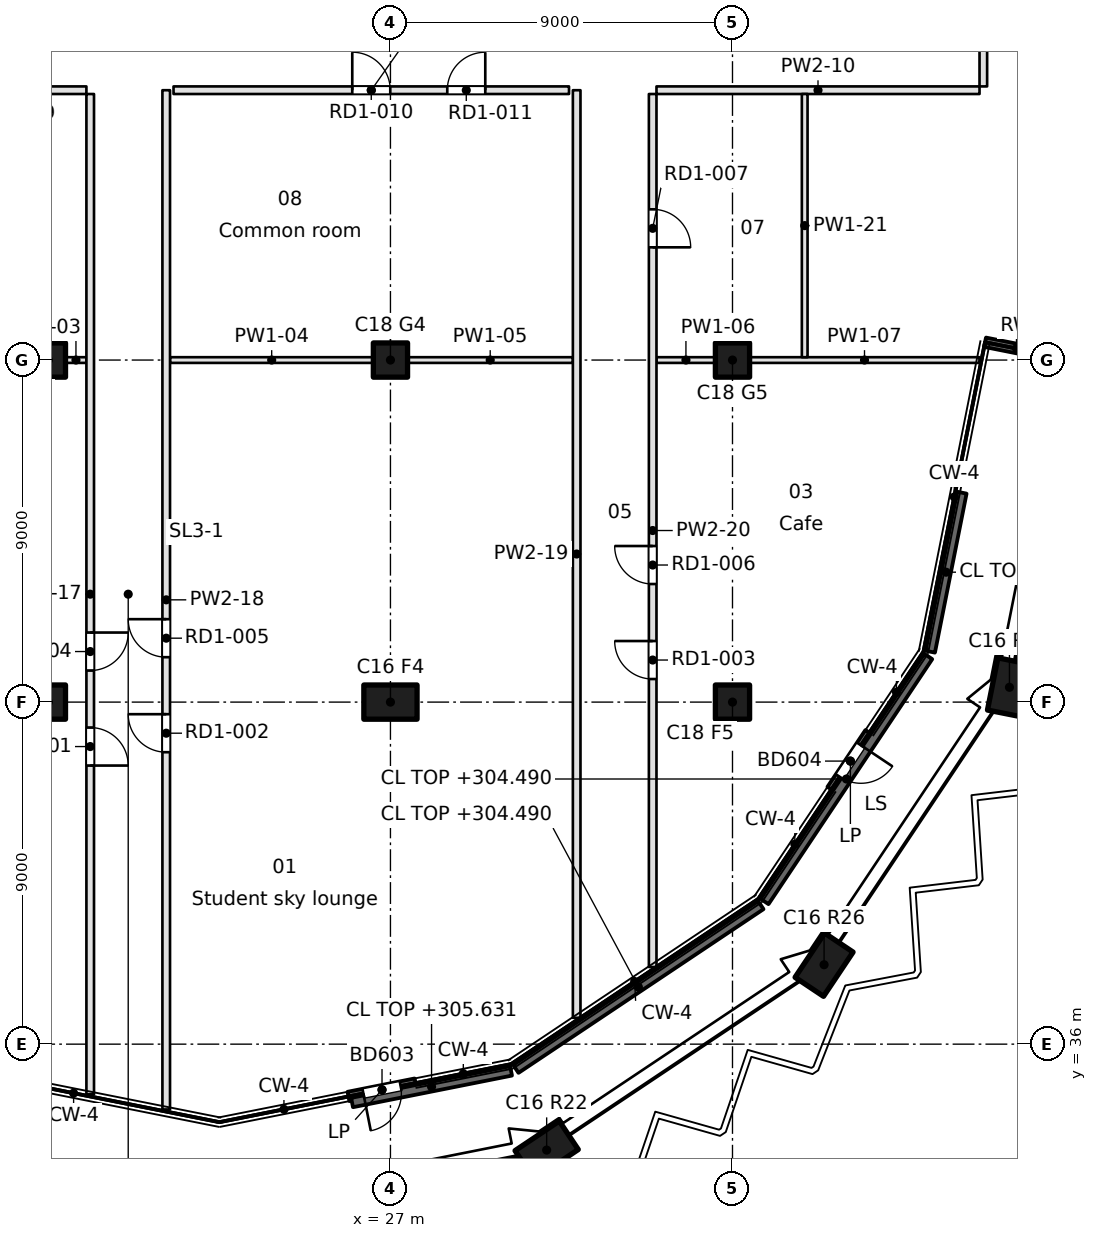
"""IFC4 building model, lengths in metres.
Left out: names, types, materials, properties, quantities, classifications, styles, units other than length and angle.
Written with IfcOpenShell. Run it as: python <this file> out.ifc"""

import sys

from ifc_helpers import new_model, si_unit, direction, frame, frame_2d, origin, origin_2d, place, context, subcontext, project, spatial, polyline, rectangle, outline, extrude, element, fill, save


model = new_model("IFC4")
c1 = context("Model", 3, precision=1e-05, world=origin(), true_north=direction((0.0, 1.0)))
c2 = subcontext(c1, "Body", "Model", "MODEL_VIEW")
j1 = project(units=[si_unit("LENGTHUNIT", "METRE"), si_unit("PLANEANGLEUNIT", "RADIAN")], contexts=[c1])
p1 = place(None, origin())
s1 = spatial("IfcSite", under=j1, at=p1, CompositionType="ELEMENT")
p2 = place(p1, origin())
s2 = spatial("IfcBuilding", under=s1, at=p2, CompositionType="ELEMENT")
p3 = place(p2, frame((0.0, 0.0, 299.3)))
s3 = spatial("IfcBuildingStorey", under=s2, at=p3, CompositionType="ELEMENT", Elevation=299.3)
p4 = place(p3, frame((31.11, 33.213, 0.0), z_axis=(0.0, 0.0, 1.0), x_axis=(0.831469612303, 0.55557023302, 0.0)))
e1 = element("IfcColumn", 1, at=p4, inside=s3, PredefinedType="COLUMN", context=c2, shape_type="SweptSolid", body=[
    extrude(rectangle(XDim=1.4, YDim=0.9, at=origin_2d()), origin(), (0.0, 0.0, 1.0), 3.45),
])
p5 = place(p3, frame((38.41, 38.09, 0.0), z_axis=(0.0, 0.0, 1.0), x_axis=(0.55557023302, 0.831469612303, 0.0)))
e2 = element("IfcColumn", 2, at=p5, inside=s3, PredefinedType="COLUMN", context=c2, shape_type="SweptSolid", body=[
    extrude(rectangle(XDim=1.4, YDim=0.9, at=origin_2d()), origin(), (0.0, 0.0, 1.0), 3.127),
])
p6 = place(p3, frame((43.287, 45.39, 0.0), z_axis=(0.0, 0.0, 1.0), x_axis=(0.195090322016, 0.980785280403, 0.0)))
e3 = element("IfcColumn", 3, at=p6, inside=s3, PredefinedType="COLUMN", context=c2, shape_type="SweptSolid", body=[
    extrude(rectangle(XDim=1.4, YDim=0.9, at=origin_2d()), origin(), (0.0, 0.0, 1.0), 3.45),
])
for number, where, z_axis, x_axis in (
    (4, (18.0, 45.0, 0.0), (0.0, 0.0, 1.0), (1.0, 0.0, 0.0)),
    (5, (18.0, 54.0, 0.0), (0.0, 0.0, 1.0), (1.0, 0.0, 0.0)),
):
    element("IfcColumn", number, at=place(p3, frame(where, z_axis=z_axis, x_axis=x_axis)), inside=s3, PredefinedType="COLUMN", context=c2, shape_type="SweptSolid", body=[
        extrude(rectangle(XDim=0.9, YDim=0.9, at=origin_2d()), origin(), (0.0, 0.0, 1.0), 3.7),
    ])
p7 = place(p3, frame((27.0, 45.0, 0.0), z_axis=(0.0, 0.0, 1.0), x_axis=(1.0, 0.0, 0.0)))
e6 = element("IfcColumn", 6, at=p7, inside=s3, PredefinedType="COLUMN", context=c2, shape_type="SweptSolid", body=[
    extrude(rectangle(XDim=1.4, YDim=0.9, at=origin_2d()), origin(), (0.0, 0.0, 1.0), 3.7),
])
p8 = place(p3, frame((27.0, 54.0, 0.0), z_axis=(0.0, 0.0, 1.0), x_axis=(1.0, 0.0, 0.0)))
e7 = element("IfcColumn", 7, at=p8, inside=s3, PredefinedType="COLUMN", context=c2, shape_type="SweptSolid", body=[
    extrude(rectangle(XDim=0.9, YDim=0.9, at=origin_2d()), origin(), (0.0, 0.0, 1.0), 3.7),
])
p9 = place(p3, frame((36.0, 45.0, 0.0), z_axis=(0.0, 0.0, 1.0), x_axis=(1.0, 0.0, 0.0)))
e8 = element("IfcColumn", 8, at=p9, inside=s3, PredefinedType="COLUMN", context=c2, shape_type="SweptSolid", body=[
    extrude(rectangle(XDim=0.9, YDim=0.9, at=origin_2d()), origin(), (0.0, 0.0, 1.0), 6.207),
])
p10 = place(p3, frame((36.0, 54.0, 0.0), z_axis=(0.0, 0.0, 1.0), x_axis=(1.0, 0.0, 0.0)))
e9 = element("IfcColumn", 9, at=p10, inside=s3, PredefinedType="COLUMN", context=c2, shape_type="SweptSolid", body=[
    extrude(rectangle(XDim=0.9, YDim=0.9, at=origin_2d()), origin(), (0.0, 0.0, 1.0), 3.7),
])
p11 = place(p3, frame((25.896, 34.624, 0.0), z_axis=(0.0, 0.0, 1.0), x_axis=(0.980793982239, 0.195046569833, 0.0)))
e10 = element("IfcWall", 10, at=p11, inside=s3, PredefinedType="SOLIDWALL", context=c2, shape_type="SweptSolid", body=[
    extrude(rectangle(XDim=1.8, YDim=0.25, at=frame_2d((0.9, 0.0))), origin(), (0.0, 0.0, 1.0), 3.25),
])
p12 = place(p11, frame((0.4, 0.0, 0.0)))
e11 = element("IfcOpeningElement", 11, at=p12, cuts=e10, PredefinedType="OPENING", context=c2, shape_type="SweptSolid", body=[
    extrude(rectangle(XDim=1.0, YDim=2.1, at=frame_2d((0.5, 1.05))), frame((0.0, 0.125, 0.0), z_axis=(0.0, -1.0, 0.0), x_axis=(1.0, 0.0, 0.0)), (0.0, 0.0, 1.0), 0.25),
])
p13 = place(p3, frame((38.602, 42.7, 0.0), z_axis=(0.0, 0.0, 1.0), x_axis=(0.555576323502, 0.83146554274, 0.0)))
e12 = element("IfcWall", 12, at=p13, inside=s3, PredefinedType="SOLIDWALL", context=c2, shape_type="SweptSolid", body=[
    extrude(rectangle(XDim=1.8, YDim=0.25, at=frame_2d((0.9, 0.0))), origin(), (0.0, 0.0, 1.0), 3.25),
])
p14 = place(p13, frame((0.4, 0.0, 0.0)))
e13 = element("IfcOpeningElement", 13, at=p14, cuts=e12, PredefinedType="OPENING", context=c2, shape_type="SweptSolid", body=[
    extrude(rectangle(XDim=1.0, YDim=2.1, at=frame_2d((0.5, 1.05))), frame((0.0, 0.125, 0.0), z_axis=(0.0, -1.0, 0.0), x_axis=(1.0, 0.0, 0.0)), (0.0, 0.0, 1.0), 0.25),
])
p15 = place(p3, frame((42.645, 54.469, 0.0), z_axis=(0.0, 0.0, 1.0), x_axis=(0.980846923473, -0.194780165092, 0.0)))
e14 = element("IfcWall", 14, at=p15, inside=s3, PredefinedType="SOLIDWALL", context=c2, shape_type="SweptSolid", body=[
    extrude(rectangle(XDim=1.687, YDim=0.25, at=frame_2d((0.844, 0.0))), origin(), (0.0, 0.0, 1.0), 3.25),
])
p16 = place(p3, frame((25.99, 34.464, 3.7), z_axis=(0.0, 0.0, 1.0), x_axis=(0.98079361582, 0.195048412366, 0.0)))
e15 = element("IfcWall", 15, at=p16, inside=s3, PredefinedType="SOLIDWALL", context=c2, shape_type="SweptSolid", body=[
    extrude(outline(polyline([(0.0, 0.0), (4.266, 0.0), (4.266, 1.514), (0.0, 2.631), (0.0, 0.0)])), frame((0.0, 0.125, 0.0), z_axis=(0.0, -1.0, 0.0), x_axis=(1.0, 0.0, 0.0)), (0.0, 0.0, 1.0), 0.25),
])
p17 = place(p3, frame((30.3, 35.348, 3.7), z_axis=(0.0, 0.0, 1.0), x_axis=(0.831458870803, 0.555586308474, 0.0)))
e16 = element("IfcWall", 16, at=p17, inside=s3, PredefinedType="SOLIDWALL", context=c2, shape_type="SweptSolid", body=[
    extrude(outline(polyline([(0.0, 0.0), (7.754, 0.0), (7.754, 0.776), (0.0, 1.49), (0.0, 0.0)])), frame((0.0, 0.125, 0.0), z_axis=(0.0, -1.0, 0.0), x_axis=(1.0, 0.0, 0.0)), (0.0, 0.0, 1.0), 0.25),
])
p18 = place(p3, frame((36.844, 39.753, 3.7), z_axis=(0.0, 0.0, 1.0), x_axis=(0.555586308474, 0.831458870803, 0.0)))
e17 = element("IfcWall", 17, at=p18, inside=s3, PredefinedType="SOLIDWALL", context=c2, shape_type="SweptSolid", body=[
    extrude(outline(polyline([(0.0, 0.0), (7.754, 0.0), (7.754, 1.49), (0.0, 0.776), (0.0, 0.0)])), frame((0.0, 0.125, 0.0), z_axis=(0.0, -1.0, 0.0), x_axis=(1.0, 0.0, 0.0)), (0.0, 0.0, 1.0), 0.25),
])
p19 = place(p3, frame((41.204, 46.326, 3.7), z_axis=(0.0, 0.0, 1.0), x_axis=(0.195103466612, 0.980782665689, 0.0)))
e18 = element("IfcWall", 18, at=p19, inside=s3, PredefinedType="SOLIDWALL", context=c2, shape_type="SweptSolid", body=[
    extrude(outline(polyline([(0.0, 0.0), (4.266, 0.0), (4.266, 2.631), (0.0, 1.514), (0.0, 0.0)])), frame((0.0, 0.125, 0.0), z_axis=(0.0, -1.0, 0.0), x_axis=(1.0, 0.0, 0.0)), (0.0, 0.0, 1.0), 0.25),
])
p20 = place(p3, frame((18.45, 54.0, 0.0), z_axis=(0.0, 0.0, 1.0), x_axis=(1.0, 0.0, 0.0)))
e19 = element("IfcWall", 19, at=p20, inside=s3, PredefinedType="PARTITIONING", context=c2, shape_type="SweptSolid", body=[
    extrude(rectangle(XDim=0.55, YDim=0.15, at=frame_2d((0.275, 0.0))), origin(), (0.0, 0.0, 1.0), 3.25),
])
p21 = place(p3, frame((21.2, 54.0, 0.0), z_axis=(0.0, 0.0, 1.0), x_axis=(1.0, 0.0, 0.0)))
e20 = element("IfcWall", 20, at=p21, inside=s3, PredefinedType="PARTITIONING", context=c2, shape_type="SweptSolid", body=[
    extrude(rectangle(XDim=5.35, YDim=0.15, at=frame_2d((2.675, 0.0))), origin(), (0.0, 0.0, 1.0), 3.25),
])
p22 = place(p3, frame((27.45, 54.0, 0.0), z_axis=(0.0, 0.0, 1.0), x_axis=(1.0, 0.0, 0.0)))
e21 = element("IfcWall", 21, at=p22, inside=s3, PredefinedType="PARTITIONING", context=c2, shape_type="SweptSolid", body=[
    extrude(rectangle(XDim=4.35, YDim=0.15, at=frame_2d((2.175, 0.0))), origin(), (0.0, 0.0, 1.0), 3.25),
])
p23 = place(p3, frame((34.0, 54.0, 0.0), z_axis=(0.0, 0.0, 1.0), x_axis=(1.0, 0.0, 0.0)))
e22 = element("IfcWall", 22, at=p23, inside=s3, PredefinedType="PARTITIONING", context=c2, shape_type="SweptSolid", body=[
    extrude(rectangle(XDim=1.55, YDim=0.15, at=frame_2d((0.775, 0.0))), origin(), (0.0, 0.0, 1.0), 3.25),
])
p24 = place(p3, frame((36.45, 54.0, 0.0), z_axis=(0.0, 0.0, 1.0), x_axis=(1.0, 0.0, 0.0)))
e23 = element("IfcWall", 23, at=p24, inside=s3, PredefinedType="PARTITIONING", context=c2, shape_type="SweptSolid", body=[
    extrude(rectangle(XDim=6.047, YDim=0.15, at=frame_2d((3.023, 0.0))), origin(), (0.0, 0.0, 1.0), 3.25),
])
p25 = place(p3, frame((19.0, 61.1, 0.0), z_axis=(0.0, 0.0, 1.0), x_axis=(-1.0, 0.0, 0.0)))
e24 = element("IfcWall", 24, at=p25, inside=s3, PredefinedType="PARTITIONING", context=c2, shape_type="SweptSolid", body=[
    extrude(rectangle(XDim=10.096, YDim=0.2, at=frame_2d((5.048, 0.0))), origin(), (0.0, 0.0, 1.0), 3.25),
])
p26 = place(p25, frame((4.548, 0.0, 0.0)))
e25 = element("IfcOpeningElement", 25, at=p26, cuts=e24, PredefinedType="OPENING", context=c2, shape_type="SweptSolid", body=[
    extrude(rectangle(XDim=1.0, YDim=2.1, at=frame_2d((0.5, 1.05))), frame((0.0, 0.1, 0.0), z_axis=(0.0, -1.0, 0.0), x_axis=(1.0, 0.0, 0.0)), (0.0, 0.0, 1.0), 0.2),
])
p27 = place(p25, frame((2.048, 0.0, 0.0)))
e26 = element("IfcOpeningElement", 26, at=p27, cuts=e24, PredefinedType="OPENING", context=c2, shape_type="SweptSolid", body=[
    extrude(rectangle(XDim=1.0, YDim=2.1, at=frame_2d((0.5, 1.05))), frame((0.0, 0.1, 0.0), z_axis=(0.0, -1.0, 0.0), x_axis=(1.0, 0.0, 0.0)), (0.0, 0.0, 1.0), 0.2),
])
p28 = place(p3, frame((31.698, 61.1, 0.0), z_axis=(0.0, 0.0, 1.0), x_axis=(-1.0, 0.0, 0.0)))
e27 = element("IfcWall", 27, at=p28, inside=s3, PredefinedType="PARTITIONING", context=c2, shape_type="SweptSolid", body=[
    extrude(rectangle(XDim=10.406, YDim=0.2, at=frame_2d((5.203, 0.0))), origin(), (0.0, 0.0, 1.0), 3.25),
])
p29 = place(p28, frame((4.703, 0.0, 0.0)))
e28 = element("IfcOpeningElement", 28, at=p29, cuts=e27, PredefinedType="OPENING", context=c2, shape_type="SweptSolid", body=[
    extrude(rectangle(XDim=1.0, YDim=2.1, at=frame_2d((0.5, 1.05))), frame((0.0, 0.1, 0.0), z_axis=(0.0, -1.0, 0.0), x_axis=(1.0, 0.0, 0.0)), (0.0, 0.0, 1.0), 0.2),
])
p30 = place(p28, frame((2.203, 0.0, 0.0)))
e29 = element("IfcOpeningElement", 29, at=p30, cuts=e27, PredefinedType="OPENING", context=c2, shape_type="SweptSolid", body=[
    extrude(rectangle(XDim=1.0, YDim=2.1, at=frame_2d((0.5, 1.05))), frame((0.0, 0.1, 0.0), z_axis=(0.0, -1.0, 0.0), x_axis=(1.0, 0.0, 0.0)), (0.0, 0.0, 1.0), 0.2),
])
p31 = place(p3, frame((42.5, 61.1, 0.0), z_axis=(0.0, 0.0, 1.0), x_axis=(-1.0, 0.0, 0.0)))
e30 = element("IfcWall", 30, at=p31, inside=s3, PredefinedType="PARTITIONING", context=c2, shape_type="SweptSolid", body=[
    extrude(rectangle(XDim=8.5, YDim=0.2, at=frame_2d((4.25, 0.0))), origin(), (0.0, 0.0, 1.0), 3.25),
])
p32 = place(p3, frame((19.1, 34.679, 0.0), z_axis=(0.0, 0.0, 1.0), x_axis=(0.0, 1.0, 0.0)))
e31 = element("IfcWall", 31, at=p32, inside=s3, PredefinedType="PARTITIONING", context=c2, shape_type="SweptSolid", body=[
    extrude(rectangle(XDim=26.321, YDim=0.2, at=frame_2d((13.16, 0.0))), origin(), (0.0, 0.0, 1.0), 3.25),
])
p33 = place(p32, frame((8.651, 0.0, 0.0)))
e32 = element("IfcOpeningElement", 32, at=p33, cuts=e31, PredefinedType="OPENING", context=c2, shape_type="SweptSolid", body=[
    extrude(rectangle(XDim=1.0, YDim=2.1, at=frame_2d((0.5, 1.05))), frame((0.0, 0.1, 0.0), z_axis=(0.0, -1.0, 0.0), x_axis=(1.0, 0.0, 0.0)), (0.0, 0.0, 1.0), 0.2),
])
p34 = place(p32, frame((11.151, 0.0, 0.0)))
e33 = element("IfcOpeningElement", 33, at=p34, cuts=e31, PredefinedType="OPENING", context=c2, shape_type="SweptSolid", body=[
    extrude(rectangle(XDim=1.0, YDim=2.1, at=frame_2d((0.5, 1.05))), frame((0.0, 0.1, 0.0), z_axis=(0.0, -1.0, 0.0), x_axis=(1.0, 0.0, 0.0)), (0.0, 0.0, 1.0), 0.2),
])
p35 = place(p3, frame((21.1, 61.1, 0.0), z_axis=(0.0, 0.0, 1.0), x_axis=(0.0, -1.0, 0.0)))
e34 = element("IfcWall", 34, at=p35, inside=s3, PredefinedType="PARTITIONING", context=c2, shape_type="SweptSolid", body=[
    extrude(rectangle(XDim=26.819, YDim=0.2, at=frame_2d((13.409, 0.0))), origin(), (0.0, 0.0, 1.0), 3.25),
])
p36 = place(p35, frame((16.418, 0.0, 0.0)))
e35 = element("IfcOpeningElement", 35, at=p36, cuts=e34, PredefinedType="OPENING", context=c2, shape_type="SweptSolid", body=[
    extrude(rectangle(XDim=1.0, YDim=2.1, at=frame_2d((0.5, 1.05))), frame((0.0, 0.1, 0.0), z_axis=(0.0, -1.0, 0.0), x_axis=(1.0, 0.0, 0.0)), (0.0, 0.0, 1.0), 0.2),
])
p37 = place(p35, frame((13.918, 0.0, 0.0)))
e36 = element("IfcOpeningElement", 36, at=p37, cuts=e34, PredefinedType="OPENING", context=c2, shape_type="SweptSolid", body=[
    extrude(rectangle(XDim=1.0, YDim=2.1, at=frame_2d((0.5, 1.05))), frame((0.0, 0.1, 0.0), z_axis=(0.0, -1.0, 0.0), x_axis=(1.0, 0.0, 0.0)), (0.0, 0.0, 1.0), 0.2),
])
p38 = place(p3, frame((31.9, 36.693, 0.0), z_axis=(0.0, 0.0, 1.0), x_axis=(0.0, 1.0, 0.0)))
e37 = element("IfcWall", 37, at=p38, inside=s3, PredefinedType="PARTITIONING", context=c2, shape_type="SweptSolid", body=[
    extrude(rectangle(XDim=24.407, YDim=0.2, at=frame_2d((12.204, 0.0))), origin(), (0.0, 0.0, 1.0), 3.25),
])
p39 = place(p3, frame((33.9, 61.0, 0.0), z_axis=(0.0, 0.0, 1.0), x_axis=(0.0, -1.0, 0.0)))
e38 = element("IfcWall", 38, at=p39, inside=s3, PredefinedType="PARTITIONING", context=c2, shape_type="SweptSolid", body=[
    extrude(rectangle(XDim=22.971, YDim=0.2, at=frame_2d((11.485, 0.0))), origin(), (0.0, 0.0, 1.0), 3.25),
])
p40 = place(p39, frame((14.393, 0.0, 0.0)))
e39 = element("IfcOpeningElement", 39, at=p40, cuts=e38, PredefinedType="OPENING", context=c2, shape_type="SweptSolid", body=[
    extrude(rectangle(XDim=1.0, YDim=2.1, at=frame_2d((0.5, 1.05))), frame((0.0, 0.1, 0.0), z_axis=(0.0, -1.0, 0.0), x_axis=(1.0, 0.0, 0.0)), (0.0, 0.0, 1.0), 0.2),
])
p41 = place(p39, frame((11.893, 0.0, 0.0)))
e40 = element("IfcOpeningElement", 40, at=p41, cuts=e38, PredefinedType="OPENING", context=c2, shape_type="SweptSolid", body=[
    extrude(rectangle(XDim=1.0, YDim=2.1, at=frame_2d((0.5, 1.05))), frame((0.0, 0.1, 0.0), z_axis=(0.0, -1.0, 0.0), x_axis=(1.0, 0.0, 0.0)), (0.0, 0.0, 1.0), 0.2),
])
p42 = place(p39, frame((3.034, 0.0, 0.0)))
e41 = element("IfcOpeningElement", 41, at=p42, cuts=e38, PredefinedType="OPENING", context=c2, shape_type="SweptSolid", body=[
    extrude(rectangle(XDim=1.0, YDim=2.1, at=frame_2d((0.5, 1.05))), frame((0.0, 0.1, 0.0), z_axis=(0.0, -1.0, 0.0), x_axis=(1.0, 0.0, 0.0)), (0.0, 0.0, 1.0), 0.2),
])
p43 = place(p3, frame((37.9, 61.0, 0.0), z_axis=(0.0, 0.0, 1.0), x_axis=(0.0, -1.0, 0.0)))
e42 = element("IfcWall", 42, at=p43, inside=s3, PredefinedType="PARTITIONING", context=c2, shape_type="SweptSolid", body=[
    extrude(rectangle(XDim=6.925, YDim=0.15, at=frame_2d((3.462, 0.0))), origin(), (0.0, 0.0, 1.0), 3.25),
])
p44 = place(p3, frame((42.6, 63.6, 0.0), z_axis=(0.0, 0.0, 1.0), x_axis=(0.0, -1.0, 0.0)))
e43 = element("IfcWall", 43, at=p44, inside=s3, PredefinedType="PARTITIONING", context=c2, shape_type="SweptSolid", body=[
    extrude(rectangle(XDim=2.4, YDim=0.2, at=frame_2d((1.2, 0.0))), origin(), (0.0, 0.0, 1.0), 3.25),
])
p45 = place(p12, frame((1.0, 0.0, 0.0), z_axis=(0.0, 0.0, 1.0), x_axis=(-1.0, 0.0, 0.0)))
e44 = element("IfcDoor", 44, at=p45, inside=s3, OperationType="SINGLE_SWING_RIGHT", PredefinedType="DOOR", context=c2, shape_type="SweptSolid", body=[
    extrude(rectangle(XDim=1.0, YDim=2.1, at=frame_2d((0.5, 1.05))), frame((0.0, 0.025, 0.0), z_axis=(0.0, -1.0, 0.0), x_axis=(1.0, 0.0, 0.0)), (0.0, 0.0, 1.0), 0.05),
])
fill(e11, e44)
p46 = place(p14, frame((1.0, 0.0, 0.0), z_axis=(0.0, 0.0, 1.0), x_axis=(-1.0, 0.0, 0.0)))
e45 = element("IfcDoor", 45, at=p46, inside=s3, OperationType="SINGLE_SWING_LEFT", PredefinedType="DOOR", context=c2, shape_type="SweptSolid", body=[
    extrude(rectangle(XDim=1.0, YDim=2.1, at=frame_2d((0.5, 1.05))), frame((0.0, 0.025, 0.0), z_axis=(0.0, -1.0, 0.0), x_axis=(1.0, 0.0, 0.0)), (0.0, 0.0, 1.0), 0.05),
])
fill(e13, e45)
p47 = place(p33, frame((1.0, 0.0, 0.0), z_axis=(0.0, 0.0, 1.0), x_axis=(-1.0, 0.0, 0.0)))
e46 = element("IfcDoor", 46, at=p47, inside=s3, OperationType="SINGLE_SWING_RIGHT", PredefinedType="DOOR", context=c2, shape_type="SweptSolid", body=[
    extrude(rectangle(XDim=1.0, YDim=2.1, at=frame_2d((0.5, 1.05))), frame((0.0, 0.025, 0.0), z_axis=(0.0, -1.0, 0.0), x_axis=(1.0, 0.0, 0.0)), (0.0, 0.0, 1.0), 0.05),
])
fill(e32, e46)
p48 = place(p36, frame((1.0, 0.0, 0.0), z_axis=(0.0, 0.0, 1.0), x_axis=(-1.0, 0.0, 0.0)))
e47 = element("IfcDoor", 47, at=p48, inside=s3, OperationType="SINGLE_SWING_RIGHT", PredefinedType="DOOR", context=c2, shape_type="SweptSolid", body=[
    extrude(rectangle(XDim=1.0, YDim=2.1, at=frame_2d((0.5, 1.05))), frame((0.0, 0.025, 0.0), z_axis=(0.0, -1.0, 0.0), x_axis=(1.0, 0.0, 0.0)), (0.0, 0.0, 1.0), 0.05),
])
fill(e35, e47)
p49 = place(p40, frame((1.0, 0.0, 0.0), z_axis=(0.0, 0.0, 1.0), x_axis=(-1.0, 0.0, 0.0)))
e48 = element("IfcDoor", 48, at=p49, inside=s3, OperationType="SINGLE_SWING_RIGHT", PredefinedType="DOOR", context=c2, shape_type="SweptSolid", body=[
    extrude(rectangle(XDim=1.0, YDim=2.1, at=frame_2d((0.5, 1.05))), frame((0.0, 0.025, 0.0), z_axis=(0.0, -1.0, 0.0), x_axis=(1.0, 0.0, 0.0)), (0.0, 0.0, 1.0), 0.05),
])
fill(e39, e48)
p50 = place(p34, frame((1.0, 0.0, 0.0), z_axis=(0.0, 0.0, 1.0), x_axis=(-1.0, 0.0, 0.0)))
e49 = element("IfcDoor", 49, at=p50, inside=s3, OperationType="SINGLE_SWING_LEFT", PredefinedType="DOOR", context=c2, shape_type="SweptSolid", body=[
    extrude(rectangle(XDim=1.0, YDim=2.1, at=frame_2d((0.5, 1.05))), frame((0.0, 0.025, 0.0), z_axis=(0.0, -1.0, 0.0), x_axis=(1.0, 0.0, 0.0)), (0.0, 0.0, 1.0), 0.05),
])
fill(e33, e49)
p51 = place(p37, frame((1.0, 0.0, 0.0), z_axis=(0.0, 0.0, 1.0), x_axis=(-1.0, 0.0, 0.0)))
e50 = element("IfcDoor", 50, at=p51, inside=s3, OperationType="SINGLE_SWING_RIGHT", PredefinedType="DOOR", context=c2, shape_type="SweptSolid", body=[
    extrude(rectangle(XDim=1.0, YDim=2.1, at=frame_2d((0.5, 1.05))), frame((0.0, 0.025, 0.0), z_axis=(0.0, -1.0, 0.0), x_axis=(1.0, 0.0, 0.0)), (0.0, 0.0, 1.0), 0.05),
])
fill(e36, e50)
p52 = place(p41, frame((1.0, 0.0, 0.0), z_axis=(0.0, 0.0, 1.0), x_axis=(-1.0, 0.0, 0.0)))
e51 = element("IfcDoor", 51, at=p52, inside=s3, OperationType="SINGLE_SWING_RIGHT", PredefinedType="DOOR", context=c2, shape_type="SweptSolid", body=[
    extrude(rectangle(XDim=1.0, YDim=2.1, at=frame_2d((0.5, 1.05))), frame((0.0, 0.025, 0.0), z_axis=(0.0, -1.0, 0.0), x_axis=(1.0, 0.0, 0.0)), (0.0, 0.0, 1.0), 0.05),
])
fill(e40, e51)
p53 = place(p42, origin())
e52 = element("IfcDoor", 52, at=p53, inside=s3, OperationType="SINGLE_SWING_RIGHT", PredefinedType="DOOR", context=c2, shape_type="SweptSolid", body=[
    extrude(rectangle(XDim=1.0, YDim=2.1, at=frame_2d((0.5, 1.05))), frame((0.0, 0.025, 0.0), z_axis=(0.0, -1.0, 0.0), x_axis=(1.0, 0.0, 0.0)), (0.0, 0.0, 1.0), 0.05),
])
fill(e41, e52)
p54 = place(p29, frame((1.0, 0.0, 0.0), z_axis=(0.0, 0.0, 1.0), x_axis=(-1.0, 0.0, 0.0)))
e53 = element("IfcDoor", 53, at=p54, inside=s3, OperationType="SINGLE_SWING_LEFT", PredefinedType="DOOR", context=c2, shape_type="SweptSolid", body=[
    extrude(rectangle(XDim=1.0, YDim=2.1, at=frame_2d((0.5, 1.05))), frame((0.0, 0.025, 0.0), z_axis=(0.0, -1.0, 0.0), x_axis=(1.0, 0.0, 0.0)), (0.0, 0.0, 1.0), 0.05),
])
fill(e28, e53)
p55 = place(p30, frame((1.0, 0.0, 0.0), z_axis=(0.0, 0.0, 1.0), x_axis=(-1.0, 0.0, 0.0)))
e54 = element("IfcDoor", 54, at=p55, inside=s3, OperationType="SINGLE_SWING_RIGHT", PredefinedType="DOOR", context=c2, shape_type="SweptSolid", body=[
    extrude(rectangle(XDim=1.0, YDim=2.1, at=frame_2d((0.5, 1.05))), frame((0.0, 0.025, 0.0), z_axis=(0.0, -1.0, 0.0), x_axis=(1.0, 0.0, 0.0)), (0.0, 0.0, 1.0), 0.05),
])
fill(e29, e54)
save(model, sys.argv[1])
